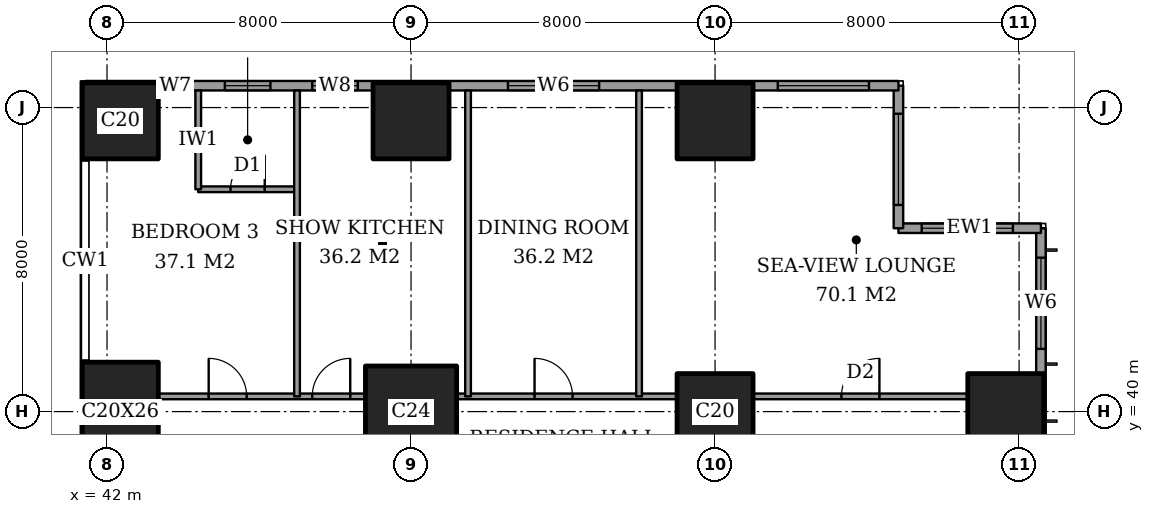
"""IFC4 building model, lengths in metres.
Left out: names, types, materials, properties, quantities, classifications, styles, units other than length and angle.
Written with IfcOpenShell. Run it as: python <this file> out.ifc"""

import sys

from ifc_helpers import new_model, si_unit, direction, frame, frame_2d, origin, origin_2d, place, context, subcontext, project, spatial, rectangle, extrude, element, fill, save


model = new_model("IFC4")
c1 = context("Model", 3, precision=1e-05, world=origin(), true_north=direction((0.0, 1.0)))
c2 = subcontext(c1, "Body", "Model", "MODEL_VIEW")
j1 = project(units=[si_unit("LENGTHUNIT", "METRE"), si_unit("PLANEANGLEUNIT", "RADIAN")], contexts=[c1])
p1 = place(None, origin())
s1 = spatial("IfcSite", under=j1, at=p1, CompositionType="ELEMENT")
p2 = place(p1, origin())
s2 = spatial("IfcBuilding", under=s1, at=p2, CompositionType="ELEMENT")
p3 = place(p2, frame((0.0, 0.0, 69.2)))
s3 = spatial("IfcBuildingStorey", under=s2, at=p3, CompositionType="ELEMENT", Elevation=69.2)
p4 = place(p3, frame((42.35, 40.0, 0.0), z_axis=(0.0, 0.0, 1.0), x_axis=(1.0, 0.0, 0.0)))
e1 = element("IfcColumn", 1, at=p4, inside=s3, PredefinedType="COLUMN", context=c2, shape_type="SweptSolid", body=[
    extrude(rectangle(XDim=2.0, YDim=2.6, at=origin_2d()), origin(), (0.0, 0.0, 1.0), 3.6),
])
p5 = place(p3, frame((42.35, 47.65, 0.0), z_axis=(0.0, 0.0, 1.0), x_axis=(1.0, 0.0, 0.0)))
e2 = element("IfcColumn", 2, at=p5, inside=s3, PredefinedType="COLUMN", context=c2, shape_type="SweptSolid", body=[
    extrude(rectangle(XDim=2.0, YDim=2.0, at=origin_2d()), origin(), (0.0, 0.0, 1.0), 3.6),
])
p6 = place(p3, frame((50.0, 40.0, 0.0), z_axis=(0.0, 0.0, 1.0), x_axis=(1.0, 0.0, 0.0)))
e3 = element("IfcColumn", 3, at=p6, inside=s3, PredefinedType="COLUMN", context=c2, shape_type="SweptSolid", body=[
    extrude(rectangle(XDim=2.4, YDim=2.4, at=origin_2d()), origin(), (0.0, 0.0, 1.0), 3.6),
])
for number, where, z_axis, x_axis in (
    (4, (50.0, 47.65, 0.0), (0.0, 0.0, 1.0), (1.0, 0.0, 0.0)),
    (5, (58.0, 40.0, 0.0), (0.0, 0.0, 1.0), (1.0, 0.0, 0.0)),
    (6, (58.0, 47.65, 0.0), (0.0, 0.0, 1.0), (1.0, 0.0, 0.0)),
    (7, (65.65, 40.0, 0.0), (0.0, 0.0, 1.0), (1.0, 0.0, 0.0)),
):
    element("IfcColumn", number, at=place(p3, frame(where, z_axis=z_axis, x_axis=x_axis)), inside=s3, PredefinedType="COLUMN", context=c2, shape_type="SweptSolid", body=[
        extrude(rectangle(XDim=2.0, YDim=2.0, at=origin_2d()), origin(), (0.0, 0.0, 1.0), 3.6),
    ])
p7 = place(p3, frame((66.575, 3.175, 0.0), z_axis=(0.0, 0.0, 1.0), x_axis=(0.0, 1.0, 0.0)))
e8 = element("IfcWall", 8, at=p7, inside=s3, PredefinedType="SOLIDWALL", context=c2, shape_type="SweptSolid", body=[
    extrude(rectangle(XDim=41.65, YDim=0.25, at=frame_2d((20.825, 0.0))), origin(), (0.0, 0.0, 1.0), 3.6),
])
p8 = place(p7, frame((0.775, 0.0, 0.6)))
e9 = element("IfcOpeningElement", 9, at=p8, cuts=e8, PredefinedType="OPENING", context=c2, shape_type="SweptSolid", body=[
    extrude(rectangle(XDim=2.4, YDim=2.0, at=frame_2d((1.2, 1.0))), frame((0.0, 0.135, 0.0), z_axis=(0.0, -1.0, 0.0), x_axis=(1.0, 0.0, 0.0)), (0.0, 0.0, 1.0), 0.27),
])
p9 = place(p7, frame((6.1, 0.0, 0.6)))
e10 = element("IfcOpeningElement", 10, at=p9, cuts=e8, PredefinedType="OPENING", context=c2, shape_type="SweptSolid", body=[
    extrude(rectangle(XDim=1.2, YDim=2.0, at=frame_2d((0.6, 1.0))), frame((0.0, 0.135, 0.0), z_axis=(0.0, -1.0, 0.0), x_axis=(1.0, 0.0, 0.0)), (0.0, 0.0, 1.0), 0.27),
])
p10 = place(p7, frame((8.275, 0.0, 0.6)))
e11 = element("IfcOpeningElement", 11, at=p10, cuts=e8, PredefinedType="OPENING", context=c2, shape_type="SweptSolid", body=[
    extrude(rectangle(XDim=2.4, YDim=2.0, at=frame_2d((1.2, 1.0))), frame((0.0, 0.135, 0.0), z_axis=(0.0, -1.0, 0.0), x_axis=(1.0, 0.0, 0.0)), (0.0, 0.0, 1.0), 0.27),
])
p11 = place(p7, frame((15.775, 0.0, 0.6)))
e12 = element("IfcOpeningElement", 12, at=p11, cuts=e8, PredefinedType="OPENING", context=c2, shape_type="SweptSolid", body=[
    extrude(rectangle(XDim=2.4, YDim=2.0, at=frame_2d((1.2, 1.0))), frame((0.0, 0.135, 0.0), z_axis=(0.0, -1.0, 0.0), x_axis=(1.0, 0.0, 0.0)), (0.0, 0.0, 1.0), 0.27),
])
p12 = place(p7, frame((23.475, 0.0, 0.6)))
e13 = element("IfcOpeningElement", 13, at=p12, cuts=e8, PredefinedType="OPENING", context=c2, shape_type="SweptSolid", body=[
    extrude(rectangle(XDim=2.4, YDim=2.0, at=frame_2d((1.2, 1.0))), frame((0.0, 0.135, 0.0), z_axis=(0.0, -1.0, 0.0), x_axis=(1.0, 0.0, 0.0)), (0.0, 0.0, 1.0), 0.27),
])
p13 = place(p7, frame((30.975, 0.0, 0.6)))
e14 = element("IfcOpeningElement", 14, at=p13, cuts=e8, PredefinedType="OPENING", context=c2, shape_type="SweptSolid", body=[
    extrude(rectangle(XDim=2.4, YDim=2.0, at=frame_2d((1.2, 1.0))), frame((0.0, 0.135, 0.0), z_axis=(0.0, -1.0, 0.0), x_axis=(1.0, 0.0, 0.0)), (0.0, 0.0, 1.0), 0.27),
])
p14 = place(p7, frame((34.5, 0.0, 0.6)))
e15 = element("IfcOpeningElement", 15, at=p14, cuts=e8, PredefinedType="OPENING", context=c2, shape_type="SweptSolid", body=[
    extrude(rectangle(XDim=1.2, YDim=2.0, at=frame_2d((0.6, 1.0))), frame((0.0, 0.135, 0.0), z_axis=(0.0, -1.0, 0.0), x_axis=(1.0, 0.0, 0.0)), (0.0, 0.0, 1.0), 0.27),
])
p15 = place(p7, frame((38.475, 0.0, 0.6)))
e16 = element("IfcOpeningElement", 16, at=p15, cuts=e8, PredefinedType="OPENING", context=c2, shape_type="SweptSolid", body=[
    extrude(rectangle(XDim=2.4, YDim=2.0, at=frame_2d((1.2, 1.0))), frame((0.0, 0.135, 0.0), z_axis=(0.0, -1.0, 0.0), x_axis=(1.0, 0.0, 0.0)), (0.0, 0.0, 1.0), 0.27),
])
p16 = place(p3, frame((66.575, 44.825, 0.0), z_axis=(0.0, 0.0, 1.0), x_axis=(-1.0, 0.0, 0.0)))
e17 = element("IfcWall", 17, at=p16, inside=s3, PredefinedType="SOLIDWALL", context=c2, shape_type="SweptSolid", body=[
    extrude(rectangle(XDim=3.75, YDim=0.25, at=frame_2d((1.875, 0.0))), origin(), (0.0, 0.0, 1.0), 3.6),
])
p17 = place(p16, frame((0.738, 0.0, 0.6)))
e18 = element("IfcOpeningElement", 18, at=p17, cuts=e17, PredefinedType="OPENING", context=c2, shape_type="SweptSolid", body=[
    extrude(rectangle(XDim=2.4, YDim=2.0, at=frame_2d((1.2, 1.0))), frame((0.0, 0.135, 0.0), z_axis=(0.0, -1.0, 0.0), x_axis=(1.0, 0.0, 0.0)), (0.0, 0.0, 1.0), 0.27),
])
p18 = place(p3, frame((62.825, 44.825, 0.0), z_axis=(0.0, 0.0, 1.0), x_axis=(0.0, 1.0, 0.0)))
e19 = element("IfcWall", 19, at=p18, inside=s3, PredefinedType="SOLIDWALL", context=c2, shape_type="SweptSolid", body=[
    extrude(rectangle(XDim=3.75, YDim=0.25, at=frame_2d((1.875, 0.0))), origin(), (0.0, 0.0, 1.0), 3.6),
])
p19 = place(p18, frame((0.613, 0.0, 0.6)))
e20 = element("IfcOpeningElement", 20, at=p19, cuts=e19, PredefinedType="OPENING", context=c2, shape_type="SweptSolid", body=[
    extrude(rectangle(XDim=2.4, YDim=2.0, at=frame_2d((1.2, 1.0))), frame((0.0, 0.135, 0.0), z_axis=(0.0, -1.0, 0.0), x_axis=(1.0, 0.0, 0.0)), (0.0, 0.0, 1.0), 0.27),
])
p20 = place(p3, frame((62.825, 48.575, 0.0), z_axis=(0.0, 0.0, 1.0), x_axis=(-1.0, 0.0, 0.0)))
e21 = element("IfcWall", 21, at=p20, inside=s3, PredefinedType="SOLIDWALL", context=c2, shape_type="SweptSolid", body=[
    extrude(rectangle(XDim=21.4, YDim=0.25, at=frame_2d((10.7, 0.0))), origin(), (0.0, 0.0, 1.0), 3.6),
])
p21 = place(p20, frame((0.775, 0.0, 0.6)))
e22 = element("IfcOpeningElement", 22, at=p21, cuts=e21, PredefinedType="OPENING", context=c2, shape_type="SweptSolid", body=[
    extrude(rectangle(XDim=2.4, YDim=2.0, at=frame_2d((1.2, 1.0))), frame((0.0, 0.135, 0.0), z_axis=(0.0, -1.0, 0.0), x_axis=(1.0, 0.0, 0.0)), (0.0, 0.0, 1.0), 0.27),
])
p22 = place(p20, frame((7.875, 0.0, 0.6)))
e23 = element("IfcOpeningElement", 23, at=p22, cuts=e21, PredefinedType="OPENING", context=c2, shape_type="SweptSolid", body=[
    extrude(rectangle(XDim=2.4, YDim=2.0, at=frame_2d((1.2, 1.0))), frame((0.0, 0.135, 0.0), z_axis=(0.0, -1.0, 0.0), x_axis=(1.0, 0.0, 0.0)), (0.0, 0.0, 1.0), 0.27),
])
p23 = place(p20, frame((14.225, 0.0, 0.6)))
e24 = element("IfcOpeningElement", 24, at=p23, cuts=e21, PredefinedType="OPENING", context=c2, shape_type="SweptSolid", body=[
    extrude(rectangle(XDim=1.2, YDim=2.0, at=frame_2d((0.6, 1.0))), frame((0.0, 0.135, 0.0), z_axis=(0.0, -1.0, 0.0), x_axis=(1.0, 0.0, 0.0)), (0.0, 0.0, 1.0), 0.27),
])
p24 = place(p20, frame((16.525, 0.0, 0.6)))
e25 = element("IfcOpeningElement", 25, at=p24, cuts=e21, PredefinedType="OPENING", context=c2, shape_type="SweptSolid", body=[
    extrude(rectangle(XDim=1.2, YDim=2.0, at=frame_2d((0.6, 1.0))), frame((0.0, 0.135, 0.0), z_axis=(0.0, -1.0, 0.0), x_axis=(1.0, 0.0, 0.0)), (0.0, 0.0, 1.0), 0.27),
])
p25 = place(p20, frame((18.725, 0.0, 0.6)))
e26 = element("IfcOpeningElement", 26, at=p25, cuts=e21, PredefinedType="OPENING", context=c2, shape_type="SweptSolid", body=[
    extrude(rectangle(XDim=0.6, YDim=2.0, at=frame_2d((0.3, 1.0))), frame((0.0, 0.135, 0.0), z_axis=(0.0, -1.0, 0.0), x_axis=(1.0, 0.0, 0.0)), (0.0, 0.0, 1.0), 0.27),
])
p26 = place(p3, frame((43.35, 40.4, 0.0), z_axis=(0.0, 0.0, 1.0), x_axis=(1.0, 0.0, 0.0)))
e27 = element("IfcWall", 27, at=p26, inside=s3, PredefinedType="PARTITIONING", context=c2, shape_type="SweptSolid", body=[
    extrude(rectangle(XDim=5.45, YDim=0.15, at=frame_2d((2.725, 0.0))), origin(), (0.0, 0.0, 1.0), 3.35),
])
p27 = place(p26, frame((4.05, 0.0, 0.0)))
e28 = element("IfcOpeningElement", 28, at=p27, cuts=e27, PredefinedType="OPENING", context=c2, shape_type="SweptSolid", body=[
    extrude(rectangle(XDim=1.0, YDim=2.1, at=frame_2d((0.5, 1.05))), frame((0.0, 0.085, 0.0), z_axis=(0.0, -1.0, 0.0), x_axis=(1.0, 0.0, 0.0)), (0.0, 0.0, 1.0), 0.17),
])
p28 = place(p26, frame((1.325, 0.0, 0.0)))
e29 = element("IfcOpeningElement", 29, at=p28, cuts=e27, PredefinedType="OPENING", context=c2, shape_type="SweptSolid", body=[
    extrude(rectangle(XDim=1.0, YDim=2.1, at=frame_2d((0.5, 1.05))), frame((0.0, 0.085, 0.0), z_axis=(0.0, -1.0, 0.0), x_axis=(1.0, 0.0, 0.0)), (0.0, 0.0, 1.0), 0.17),
])
p29 = place(p3, frame((51.2, 40.4, 0.0), z_axis=(0.0, 0.0, 1.0), x_axis=(1.0, 0.0, 0.0)))
e30 = element("IfcWall", 30, at=p29, inside=s3, PredefinedType="PARTITIONING", context=c2, shape_type="SweptSolid", body=[
    extrude(rectangle(XDim=5.8, YDim=0.15, at=frame_2d((2.9, 0.0))), origin(), (0.0, 0.0, 1.0), 3.35),
])
p30 = place(p29, frame((2.05, 0.0, 0.0)))
e31 = element("IfcOpeningElement", 31, at=p30, cuts=e30, PredefinedType="OPENING", context=c2, shape_type="SweptSolid", body=[
    extrude(rectangle(XDim=1.0, YDim=2.1, at=frame_2d((0.5, 1.05))), frame((0.0, 0.085, 0.0), z_axis=(0.0, -1.0, 0.0), x_axis=(1.0, 0.0, 0.0)), (0.0, 0.0, 1.0), 0.17),
])
p31 = place(p3, frame((59.0, 40.4, 0.0), z_axis=(0.0, 0.0, 1.0), x_axis=(1.0, 0.0, 0.0)))
e32 = element("IfcWall", 32, at=p31, inside=s3, PredefinedType="PARTITIONING", context=c2, shape_type="SweptSolid", body=[
    extrude(rectangle(XDim=5.65, YDim=0.15, at=frame_2d((2.825, 0.0))), origin(), (0.0, 0.0, 1.0), 3.35),
])
p32 = place(p31, frame((2.325, 0.0, 0.0)))
e33 = element("IfcOpeningElement", 33, at=p32, cuts=e32, PredefinedType="OPENING", context=c2, shape_type="SweptSolid", body=[
    extrude(rectangle(XDim=1.0, YDim=2.1, at=frame_2d((0.5, 1.05))), frame((0.0, 0.085, 0.0), z_axis=(0.0, -1.0, 0.0), x_axis=(1.0, 0.0, 0.0)), (0.0, 0.0, 1.0), 0.17),
])
p33 = place(p3, frame((44.4, 45.85, 0.0), z_axis=(0.0, 0.0, 1.0), x_axis=(1.0, 0.0, 0.0)))
e34 = element("IfcWall", 34, at=p33, inside=s3, PredefinedType="PARTITIONING", context=c2, shape_type="SweptSolid", body=[
    extrude(rectangle(XDim=2.6, YDim=0.15, at=frame_2d((1.3, 0.0))), origin(), (0.0, 0.0, 1.0), 3.35),
])
p34 = place(p33, frame((0.85, 0.0, 0.0)))
e35 = element("IfcOpeningElement", 35, at=p34, cuts=e34, PredefinedType="OPENING", context=c2, shape_type="SweptSolid", body=[
    extrude(rectangle(XDim=0.9, YDim=2.1, at=frame_2d((0.45, 1.05))), frame((0.0, 0.085, 0.0), z_axis=(0.0, -1.0, 0.0), x_axis=(1.0, 0.0, 0.0)), (0.0, 0.0, 1.0), 0.17),
])
p35 = place(p3, frame((44.4, 45.85, 0.0), z_axis=(0.0, 0.0, 1.0), x_axis=(0.0, 1.0, 0.0)))
e36 = element("IfcWall", 36, at=p35, inside=s3, PredefinedType="PARTITIONING", context=c2, shape_type="SweptSolid", body=[
    extrude(rectangle(XDim=2.6, YDim=0.15, at=frame_2d((1.3, 0.0))), origin(), (0.0, 0.0, 1.0), 3.35),
])
for number, where, z_axis, x_axis in (
    (37, (47.0, 40.4, 0.0), (0.0, 0.0, 1.0), (0.0, 1.0, 0.0)),
    (38, (51.5, 40.4, 0.0), (0.0, 0.0, 1.0), (0.0, 1.0, 0.0)),
    (39, (56.0, 40.4, 0.0), (0.0, 0.0, 1.0), (0.0, 1.0, 0.0)),
):
    element("IfcWall", number, at=place(p3, frame(where, z_axis=z_axis, x_axis=x_axis)), inside=s3, PredefinedType="PARTITIONING", context=c2, shape_type="SweptSolid", body=[
        extrude(rectangle(XDim=8.05, YDim=0.15, at=frame_2d((4.025, 0.0))), origin(), (0.0, 0.0, 1.0), 3.35),
    ])
p36 = place(p15, origin())
e40 = element("IfcWindow", 40, at=p36, inside=s3, PartitioningType="SINGLE_PANEL", PredefinedType="WINDOW", context=c2, shape_type="SweptSolid", body=[
    extrude(rectangle(XDim=2.4, YDim=2.0, at=frame_2d((1.2, 1.0))), frame((0.0, 0.03, 0.0), z_axis=(0.0, -1.0, 0.0), x_axis=(1.0, 0.0, 0.0)), (0.0, 0.0, 1.0), 0.06),
])
fill(e16, e40)
p37 = place(p17, origin())
e41 = element("IfcWindow", 41, at=p37, inside=s3, PartitioningType="SINGLE_PANEL", PredefinedType="WINDOW", context=c2, shape_type="SweptSolid", body=[
    extrude(rectangle(XDim=2.4, YDim=2.0, at=frame_2d((1.2, 1.0))), frame((0.0, 0.03, 0.0), z_axis=(0.0, -1.0, 0.0), x_axis=(1.0, 0.0, 0.0)), (0.0, 0.0, 1.0), 0.06),
])
fill(e18, e41)
p38 = place(p19, origin())
e42 = element("IfcWindow", 42, at=p38, inside=s3, PartitioningType="SINGLE_PANEL", PredefinedType="WINDOW", context=c2, shape_type="SweptSolid", body=[
    extrude(rectangle(XDim=2.4, YDim=2.0, at=frame_2d((1.2, 1.0))), frame((0.0, 0.03, 0.0), z_axis=(0.0, -1.0, 0.0), x_axis=(1.0, 0.0, 0.0)), (0.0, 0.0, 1.0), 0.06),
])
fill(e20, e42)
p39 = place(p21, origin())
e43 = element("IfcWindow", 43, at=p39, inside=s3, PartitioningType="SINGLE_PANEL", PredefinedType="WINDOW", context=c2, shape_type="SweptSolid", body=[
    extrude(rectangle(XDim=2.4, YDim=2.0, at=frame_2d((1.2, 1.0))), frame((0.0, 0.03, 0.0), z_axis=(0.0, -1.0, 0.0), x_axis=(1.0, 0.0, 0.0)), (0.0, 0.0, 1.0), 0.06),
])
fill(e22, e43)
p40 = place(p22, origin())
e44 = element("IfcWindow", 44, at=p40, inside=s3, PartitioningType="SINGLE_PANEL", PredefinedType="WINDOW", context=c2, shape_type="SweptSolid", body=[
    extrude(rectangle(XDim=2.4, YDim=2.0, at=frame_2d((1.2, 1.0))), frame((0.0, 0.03, 0.0), z_axis=(0.0, -1.0, 0.0), x_axis=(1.0, 0.0, 0.0)), (0.0, 0.0, 1.0), 0.06),
])
fill(e23, e44)
p41 = place(p23, origin())
e45 = element("IfcWindow", 45, at=p41, inside=s3, PartitioningType="SINGLE_PANEL", PredefinedType="WINDOW", context=c2, shape_type="SweptSolid", body=[
    extrude(rectangle(XDim=1.2, YDim=2.0, at=frame_2d((0.6, 1.0))), frame((0.0, 0.03, 0.0), z_axis=(0.0, -1.0, 0.0), x_axis=(1.0, 0.0, 0.0)), (0.0, 0.0, 1.0), 0.06),
])
fill(e24, e45)
p42 = place(p24, origin())
e46 = element("IfcWindow", 46, at=p42, inside=s3, PartitioningType="SINGLE_PANEL", PredefinedType="WINDOW", context=c2, shape_type="SweptSolid", body=[
    extrude(rectangle(XDim=1.2, YDim=2.0, at=frame_2d((0.6, 1.0))), frame((0.0, 0.03, 0.0), z_axis=(0.0, -1.0, 0.0), x_axis=(1.0, 0.0, 0.0)), (0.0, 0.0, 1.0), 0.06),
])
fill(e25, e46)
p43 = place(p25, origin())
e47 = element("IfcWindow", 47, at=p43, inside=s3, PartitioningType="SINGLE_PANEL", PredefinedType="WINDOW", context=c2, shape_type="SweptSolid", body=[
    extrude(rectangle(XDim=0.6, YDim=2.0, at=frame_2d((0.3, 1.0))), frame((0.0, 0.03, 0.0), z_axis=(0.0, -1.0, 0.0), x_axis=(1.0, 0.0, 0.0)), (0.0, 0.0, 1.0), 0.06),
])
fill(e26, e47)
p44 = place(p32, origin())
e48 = element("IfcDoor", 48, at=p44, inside=s3, OperationType="SINGLE_SWING_LEFT", PredefinedType="DOOR", context=c2, shape_type="SweptSolid", body=[
    extrude(rectangle(XDim=1.0, YDim=2.1, at=frame_2d((0.5, 1.05))), frame((0.0, 0.025, 0.0), z_axis=(0.0, -1.0, 0.0), x_axis=(1.0, 0.0, 0.0)), (0.0, 0.0, 1.0), 0.05),
])
fill(e33, e48)
p45 = place(p30, origin())
e49 = element("IfcDoor", 49, at=p45, inside=s3, OperationType="SINGLE_SWING_RIGHT", PredefinedType="DOOR", context=c2, shape_type="SweptSolid", body=[
    extrude(rectangle(XDim=1.0, YDim=2.1, at=frame_2d((0.5, 1.05))), frame((0.0, 0.025, 0.0), z_axis=(0.0, -1.0, 0.0), x_axis=(1.0, 0.0, 0.0)), (0.0, 0.0, 1.0), 0.05),
])
fill(e31, e49)
p46 = place(p27, origin())
e50 = element("IfcDoor", 50, at=p46, inside=s3, OperationType="SINGLE_SWING_LEFT", PredefinedType="DOOR", context=c2, shape_type="SweptSolid", body=[
    extrude(rectangle(XDim=1.0, YDim=2.1, at=frame_2d((0.5, 1.05))), frame((0.0, 0.025, 0.0), z_axis=(0.0, -1.0, 0.0), x_axis=(1.0, 0.0, 0.0)), (0.0, 0.0, 1.0), 0.05),
])
fill(e28, e50)
p47 = place(p34, origin())
e51 = element("IfcDoor", 51, at=p47, inside=s3, OperationType="SINGLE_SWING_LEFT", PredefinedType="DOOR", context=c2, shape_type="SweptSolid", body=[
    extrude(rectangle(XDim=0.9, YDim=2.1, at=frame_2d((0.45, 1.05))), frame((0.0, 0.025, 0.0), z_axis=(0.0, -1.0, 0.0), x_axis=(1.0, 0.0, 0.0)), (0.0, 0.0, 1.0), 0.05),
])
fill(e35, e51)
p48 = place(p28, origin())
e52 = element("IfcDoor", 52, at=p48, inside=s3, OperationType="SINGLE_SWING_RIGHT", PredefinedType="DOOR", context=c2, shape_type="SweptSolid", body=[
    extrude(rectangle(XDim=1.0, YDim=2.1, at=frame_2d((0.5, 1.05))), frame((0.0, 0.025, 0.0), z_axis=(0.0, -1.0, 0.0), x_axis=(1.0, 0.0, 0.0)), (0.0, 0.0, 1.0), 0.05),
])
fill(e29, e52)
save(model, sys.argv[1])
